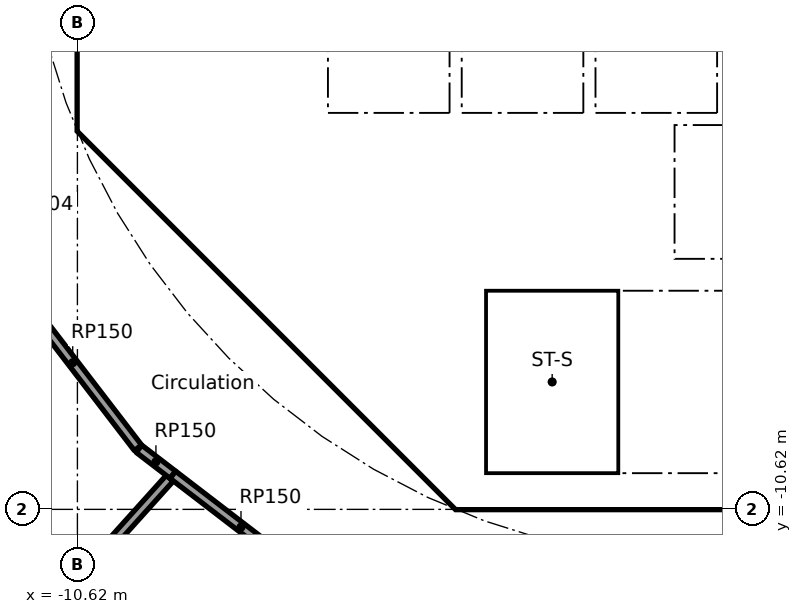
"""IFC4 building model, lengths in metres.
Left out: names, types, materials, properties, quantities, classifications, styles, units other than length and angle.
Written with IfcOpenShell. Run it as: python <this file> out.ifc"""

import sys

from ifc_helpers import new_model, si_unit, direction, frame, frame_2d, origin, place, context, subcontext, project, spatial, polyline, rectangle, outline, extrude, element, fill, save


model = new_model("IFC4")
c1 = context("Model", 3, precision=1e-05, world=origin(), true_north=direction((0.0, 1.0)))
c2 = subcontext(c1, "Body", "Model", "MODEL_VIEW")
j1 = project(units=[si_unit("LENGTHUNIT", "METRE"), si_unit("PLANEANGLEUNIT", "RADIAN")], contexts=[c1])
p1 = place(None, origin())
s1 = spatial("IfcSite", under=j1, at=p1, CompositionType="ELEMENT")
p2 = place(p1, origin())
s2 = spatial("IfcBuilding", under=s1, at=p2, CompositionType="ELEMENT")
p3 = place(p2, frame((0.0, 0.0, 67.7)))
s3 = spatial("IfcBuildingStorey", under=s2, at=p3, CompositionType="ELEMENT", Elevation=67.7)
p4 = place(p3, frame((-10.325, 3.801, 0.0), z_axis=(0.0, 0.0, 1.0), x_axis=(0.0, -1.0, 0.0)))
e1 = element("IfcWall", 1, at=p4, inside=s3, PredefinedType="SHEAR", context=c2, shape_type="SweptSolid", body=[
    extrude(rectangle(XDim=7.602, YDim=0.6, at=frame_2d((3.801, 0.0))), origin(), (0.0, 0.0, 1.0), 5.34),
])
p5 = place(p4, frame((0.651, 0.0, 0.0)))
e2 = element("IfcOpeningElement", 2, at=p5, cuts=e1, PredefinedType="OPENING", context=c2, shape_type="SweptSolid", body=[
    extrude(rectangle(XDim=1.5, YDim=2.1, at=frame_2d((0.75, 1.05))), frame((0.0, 0.31, 0.0), z_axis=(0.0, -1.0, 0.0), x_axis=(1.0, 0.0, 0.0)), (0.0, 0.0, 1.0), 0.62),
])
p6 = place(p4, frame((5.451, 0.0, 0.0)))
e3 = element("IfcOpeningElement", 3, at=p6, cuts=e1, PredefinedType="OPENING", context=c2, shape_type="SweptSolid", body=[
    extrude(rectangle(XDim=1.5, YDim=2.1, at=frame_2d((0.75, 1.05))), frame((0.0, 0.31, 0.0), z_axis=(0.0, -1.0, 0.0), x_axis=(1.0, 0.0, 0.0)), (0.0, 0.0, 1.0), 0.62),
])
p7 = place(p3, frame((-9.988, -4.613, 0.0), z_axis=(0.0, 0.0, 1.0), x_axis=(0.707106781187, -0.707106781187, 0.0)))
e4 = element("IfcWall", 4, at=p7, inside=s3, PredefinedType="SHEAR", context=c2, shape_type="SweptSolid", body=[
    extrude(rectangle(XDim=7.602, YDim=0.6, at=frame_2d((3.801, 0.0))), origin(), (0.0, 0.0, 1.0), 5.34),
])
p8 = place(p7, frame((6.151, 0.0, 0.0)))
e5 = element("IfcOpeningElement", 5, at=p8, cuts=e4, PredefinedType="OPENING", context=c2, shape_type="SweptSolid", body=[
    extrude(rectangle(XDim=1.1, YDim=2.1, at=frame_2d((0.55, 1.05))), frame((0.0, 0.31, 0.0), z_axis=(0.0, -1.0, 0.0), x_axis=(1.0, 0.0, 0.0)), (0.0, 0.0, 1.0), 0.62),
])
p9 = place(p3, frame((-7.0, -7.027, 0.0), z_axis=(0.0, 0.0, 1.0), x_axis=(0.0, 1.0, 0.0)))
e6 = element("IfcWall", 6, at=p9, inside=s3, PredefinedType="PARTITIONING", context=c2, shape_type="SweptSolid", body=[
    extrude(rectangle(XDim=2.927, YDim=0.15, at=frame_2d((1.463, 0.0))), origin(), (0.0, 0.0, 1.0), 5.34),
])
p10 = place(p9, frame((0.976, 0.0, 0.0)))
e7 = element("IfcOpeningElement", 7, at=p10, cuts=e6, PredefinedType="OPENING", context=c2, shape_type="SweptSolid", body=[
    extrude(rectangle(XDim=0.9, YDim=2.1, at=frame_2d((0.45, 1.05))), frame((0.0, 0.085, 0.0), z_axis=(0.0, -1.0, 0.0), x_axis=(1.0, 0.0, 0.0)), (0.0, 0.0, 1.0), 0.17),
])
p11 = place(p3, frame((-4.0, -6.5, 0.0), z_axis=(0.0, 0.0, 1.0), x_axis=(0.0, 1.0, 0.0)))
e8 = element("IfcWall", 8, at=p11, inside=s3, PredefinedType="SOLIDWALL", context=c2, shape_type="SweptSolid", body=[
    extrude(rectangle(XDim=2.2, YDim=0.2, at=frame_2d((1.1, 0.0))), origin(), (0.0, 0.0, 1.0), 5.34),
])
p12 = place(p11, frame((0.65, 0.0, 0.0)))
e9 = element("IfcOpeningElement", 9, at=p12, cuts=e8, PredefinedType="OPENING", context=c2, shape_type="SweptSolid", body=[
    extrude(rectangle(XDim=0.9, YDim=2.1, at=frame_2d((0.45, 1.05))), frame((0.0, 0.11, 0.0), z_axis=(0.0, -1.0, 0.0), x_axis=(1.0, 0.0, 0.0)), (0.0, 0.0, 1.0), 0.22),
])
p13 = place(p3, origin())
e10 = element("IfcWall", 10, at=p13, inside=s3, PredefinedType="SHEAR", context=c2, shape_type="SweptSolid", body=[
    extrude(outline(polyline([(-10.625, -3.801), (-10.025, -3.801), (-10.025, -4.152), (-9.776, -4.401), (-10.2, -4.825), (-10.625, -4.401), (-10.625, -3.801)])), origin(), (0.0, 0.0, 1.0), 5.34),
])
p14 = place(p3, origin())
e11 = element("IfcWall", 11, at=p14, inside=s3, PredefinedType="SHEAR", context=c2, shape_type="SweptSolid", body=[
    extrude(outline(polyline([(-4.152, -10.025), (4.152, -10.025), (4.401, -9.776), (4.825, -10.2), (4.401, -10.625), (-4.401, -10.625), (-4.825, -10.2), (-4.401, -9.776), (-4.152, -10.025)])), origin(), (0.0, 0.0, 1.0), 5.34),
])
p15 = place(p3, frame((-10.025, -4.0, 0.0), z_axis=(0.0, 0.0, 1.0), x_axis=(1.0, 0.0, 0.0)))
e12 = element("IfcWall", 12, at=p15, inside=s3, PredefinedType="PARTITIONING", context=c2, shape_type="SweptSolid", body=[
    extrude(rectangle(XDim=3.325, YDim=0.2, at=frame_2d((1.662, 0.0))), origin(), (0.0, 0.0, 1.0), 5.34),
])
p16 = place(p3, frame((-0.9, -6.5, 0.0), z_axis=(0.0, 0.0, 1.0), x_axis=(0.0, 1.0, 0.0)))
e13 = element("IfcWall", 13, at=p16, inside=s3, PredefinedType="SOLIDWALL", context=c2, shape_type="SweptSolid", body=[
    extrude(rectangle(XDim=2.2, YDim=0.2, at=frame_2d((1.1, 0.0))), origin(), (0.0, 0.0, 1.0), 5.34),
])
p17 = place(p3, origin())
e14 = element("IfcWall", 14, at=p17, inside=s3, PredefinedType="SOLIDWALL", context=c2, shape_type="SweptSolid", body=[
    extrude(outline(polyline([(-6.7, -2.1), (-6.5, -2.1), (-6.5, -4.1), (-4.5, -4.1), (-4.5, -2.1), (-4.3, -2.1), (-4.3, -4.1), (-2.3, -4.1), (-2.3, -2.1), (-2.1, -2.1), (-2.1, -4.1), (-0.1, -4.1), (-0.1, -2.1), (0.1, -2.1), (0.1, -4.1), (2.1, -4.1), (2.1, -2.1), (2.3, -2.1), (2.3, -4.1), (4.3, -4.1), (4.3, -2.1), (4.5, -2.1), (4.5, -4.1), (6.5, -4.1), (6.5, -2.1), (6.7, -2.1), (6.7, -4.3), (-6.7, -4.3), (-6.7, -2.1)])), origin(), (0.0, 0.0, 1.0), 5.34),
])
p18 = place(p3, origin())
e15 = element("IfcWall", 15, at=p18, inside=s3, PredefinedType="SOLIDWALL", context=c2, shape_type="SweptSolid", body=[
    extrude(outline(polyline([(-3.9, -10.025), (-4.1, -10.025), (-4.1, -7.025), (-3.9, -7.025), (-3.9, -10.025)])), origin(), (0.0, 0.0, 1.0), 5.34),
])
p19 = place(p3, origin())
e16 = element("IfcWall", 16, at=p19, inside=s3, PredefinedType="SOLIDWALL", context=c2, shape_type="SweptSolid", body=[
    extrude(outline(polyline([(4.1, -7.025), (-4.1, -7.025), (-4.1, -6.5), (4.1, -6.5), (4.1, -7.025)])), origin(), (0.0, 0.0, 1.0), 5.34),
])
p20 = place(p3, frame((-9.624, -9.607, 0.0), z_axis=(0.0, 0.0, 1.0), x_axis=(-0.608736710054, 0.793372307201, 0.0)))
e17 = element("IfcWall", 17, at=p20, inside=s3, PredefinedType="PARTITIONING", context=c2, shape_type="SweptSolid", body=[
    extrude(rectangle(XDim=3.527, YDim=0.15, at=frame_2d((1.763, 0.0))), origin(), (0.0, 0.0, 1.0), 5.34),
])
p21 = place(p3, frame((-9.101, -10.107, 0.0), z_axis=(0.0, 0.0, 1.0), x_axis=(-0.669132472721, -0.743143144994, 0.0)))
e18 = element("IfcWall", 18, at=p21, inside=s3, PredefinedType="PARTITIONING", context=c2, shape_type="SweptSolid", body=[
    extrude(rectangle(XDim=14.392, YDim=0.15, at=frame_2d((7.196, 0.0))), origin(), (0.0, 0.0, 1.0), 5.34),
])
p22 = place(p3, frame((-9.05, -10.051, 0.0), z_axis=(0.0, 0.0, 1.0), x_axis=(-0.793399175387, 0.608701690893, 0.0)))
e19 = element("IfcWall", 19, at=p22, inside=s3, PredefinedType="PARTITIONING", context=c2, shape_type="SweptSolid", body=[
    extrude(rectangle(XDim=0.702, YDim=0.15, at=frame_2d((0.351, 0.0))), origin(), (0.0, 0.0, 1.0), 5.34),
])
p23 = place(p3, frame((-6.809, -11.771, 0.0), z_axis=(0.0, 0.0, 1.0), x_axis=(-0.793365630445, 0.608745411834, 0.0)))
e20 = element("IfcWall", 20, at=p23, inside=s3, PredefinedType="PARTITIONING", context=c2, shape_type="SweptSolid", body=[
    extrude(rectangle(XDim=2.825, YDim=0.15, at=frame_2d((1.412, 0.0))), origin(), (0.0, 0.0, 1.0), 5.34),
])
p24 = place(p10, origin())
e21 = element("IfcDoor", 21, at=p24, inside=s3, OperationType="SINGLE_SWING_LEFT", PredefinedType="DOOR", context=c2, shape_type="SweptSolid", body=[
    extrude(rectangle(XDim=0.9, YDim=2.1, at=frame_2d((0.45, 1.05))), frame((0.0, 0.025, 0.0), z_axis=(0.0, -1.0, 0.0), x_axis=(1.0, 0.0, 0.0)), (0.0, 0.0, 1.0), 0.05),
])
fill(e7, e21)
p25 = place(p12, frame((0.9, 0.0, 0.0), x_axis=(-1.0, 0.0, 0.0)))
e22 = element("IfcDoor", 22, at=p25, inside=s3, OperationType="SINGLE_SWING_RIGHT", PredefinedType="DOOR", context=c2, shape_type="SweptSolid", body=[
    extrude(rectangle(XDim=0.9, YDim=2.1, at=frame_2d((0.45, 1.05))), frame((0.0, 0.025, 0.0), z_axis=(0.0, -1.0, 0.0), x_axis=(1.0, 0.0, 0.0)), (0.0, 0.0, 1.0), 0.05),
])
fill(e9, e22)
p26 = place(p6, origin())
e23 = element("IfcDoor", 23, at=p26, inside=s3, OperationType="DOUBLE_DOOR_SINGLE_SWING", PredefinedType="DOOR", context=c2, shape_type="SweptSolid", body=[
    extrude(rectangle(XDim=1.5, YDim=2.1, at=frame_2d((0.75, 1.05))), frame((0.0, 0.025, 0.0), z_axis=(0.0, -1.0, 0.0), x_axis=(1.0, 0.0, 0.0)), (0.0, 0.0, 1.0), 0.05),
])
fill(e3, e23)
p27 = place(p8, origin())
e24 = element("IfcDoor", 24, at=p27, inside=s3, OperationType="SINGLE_SWING_LEFT", PredefinedType="DOOR", context=c2, shape_type="SweptSolid", body=[
    extrude(rectangle(XDim=1.1, YDim=2.1, at=frame_2d((0.55, 1.05))), frame((0.0, 0.025, 0.0), z_axis=(0.0, -1.0, 0.0), x_axis=(1.0, 0.0, 0.0)), (0.0, 0.0, 1.0), 0.05),
])
fill(e5, e24)
save(model, sys.argv[1])
